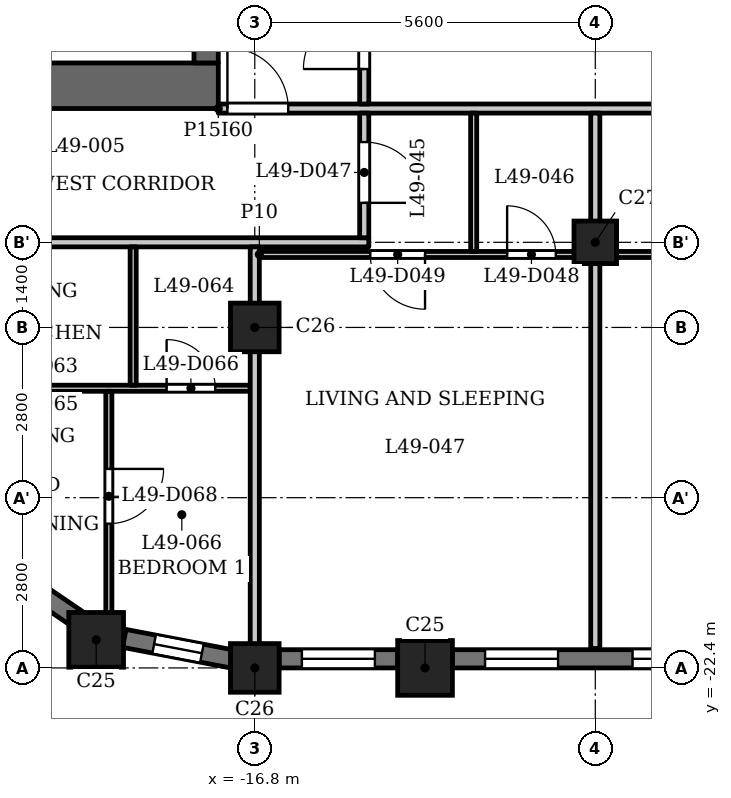
"""IFC4 building model, lengths in metres.
Left out: names, types, materials, properties, quantities, classifications, styles, units other than length and angle.
Written with IfcOpenShell. Run it as: python <this file> out.ifc"""

import sys

from ifc_helpers import new_model, si_unit, direction, frame, frame_2d, origin, origin_2d, place, context, subcontext, project, spatial, rectangle, extrude, element, fill, save


model = new_model("IFC4")
c1 = context("Model", 3, precision=1e-05, world=origin(), true_north=direction((0.0, 1.0)))
c2 = subcontext(c1, "Body", "Model", "MODEL_VIEW")
j1 = project(units=[si_unit("LENGTHUNIT", "METRE"), si_unit("PLANEANGLEUNIT", "RADIAN")], contexts=[c1])
p1 = place(None, origin())
s1 = spatial("IfcSite", under=j1, at=p1, CompositionType="ELEMENT")
p2 = place(p1, origin())
s2 = spatial("IfcBuilding", under=s1, at=p2, CompositionType="ELEMENT")
p3 = place(p2, frame((0.0, 0.0, 192.4)))
s3 = spatial("IfcBuildingStorey", under=s2, at=p3, CompositionType="ELEMENT", Elevation=192.4)
for number, where, z_axis, x_axis in (
    (1, (-19.409, -21.938, 0.0), (0.0, 0.0, 1.0), (1.0, 0.0, 0.0)),
    (2, (-14.0, -22.4, 0.0), (0.0, 0.0, 1.0), (1.0, 0.0, 0.0)),
):
    element("IfcColumn", number, at=place(p3, frame(where, z_axis=z_axis, x_axis=x_axis)), inside=s3, PredefinedType="COLUMN", context=c2, shape_type="SweptSolid", body=[
        extrude(rectangle(XDim=0.9, YDim=0.9, at=origin_2d()), origin(), (0.0, 0.0, 1.0), 3.5),
    ])
for number, where, z_axis, x_axis in (
    (3, (-16.8, -22.4, 0.0), (0.0, 0.0, 1.0), (1.0, 0.0, 0.0)),
    (4, (-16.8, -16.8, 0.0), (0.0, 0.0, 1.0), (1.0, 0.0, 0.0)),
):
    element("IfcColumn", number, at=place(p3, frame(where, z_axis=z_axis, x_axis=x_axis)), inside=s3, PredefinedType="COLUMN", context=c2, shape_type="SweptSolid", body=[
        extrude(rectangle(XDim=0.8, YDim=0.8, at=origin_2d()), origin(), (0.0, 0.0, 1.0), 3.5),
    ])
p4 = place(p3, frame((-11.2, -15.4, 0.0), z_axis=(0.0, 0.0, 1.0), x_axis=(1.0, 0.0, 0.0)))
e5 = element("IfcColumn", 5, at=p4, inside=s3, PredefinedType="COLUMN", context=c2, shape_type="SweptSolid", body=[
    extrude(rectangle(XDim=0.7, YDim=0.7, at=origin_2d()), origin(), (0.0, 0.0, 1.0), 3.5),
])
p5 = place(p3, frame((-20.775, -20.876, 0.0), z_axis=(0.0, 0.0, 1.0), x_axis=(0.827075824828, -0.562090366388, 0.0)))
e6 = element("IfcWall", 6, at=p5, inside=s3, PredefinedType="SOLIDWALL", context=c2, shape_type="SweptSolid", body=[
    extrude(rectangle(XDim=1.277, YDim=0.3, at=frame_2d((0.638, 0.0))), origin(), (0.0, 0.0, 1.0), 2.5),
])
p6 = place(p3, frame((-18.946, -21.914, 0.0), z_axis=(0.0, 0.0, 1.0), x_axis=(0.98230529033, -0.187286722942, 0.0)))
e7 = element("IfcWall", 7, at=p6, inside=s3, PredefinedType="SOLIDWALL", context=c2, shape_type="SweptSolid", body=[
    extrude(rectangle(XDim=1.799, YDim=0.3, at=frame_2d((0.899, 0.0))), origin(), (0.0, 0.0, 1.0), 2.5),
])
p7 = place(p6, frame((0.5, 0.0, 0.6)))
e8 = element("IfcOpeningElement", 8, at=p7, cuts=e7, PredefinedType="OPENING", context=c2, shape_type="SweptSolid", body=[
    extrude(rectangle(XDim=0.8, YDim=1.55, at=frame_2d((0.4, 0.775))), frame((0.0, 0.16, 0.0), z_axis=(0.0, -1.0, 0.0), x_axis=(1.0, 0.0, 0.0)), (0.0, 0.0, 1.0), 0.32),
])
p8 = place(p3, frame((-16.4, -22.25, 0.0), z_axis=(0.0, 0.0, 1.0), x_axis=(1.0, 0.0, 0.0)))
e9 = element("IfcWall", 9, at=p8, inside=s3, PredefinedType="SOLIDWALL", context=c2, shape_type="SweptSolid", body=[
    extrude(rectangle(XDim=1.95, YDim=0.3, at=frame_2d((0.975, 0.0))), origin(), (0.0, 0.0, 1.0), 2.5),
])
p9 = place(p8, frame((0.375, 0.0, 0.6)))
e10 = element("IfcOpeningElement", 10, at=p9, cuts=e9, PredefinedType="OPENING", context=c2, shape_type="SweptSolid", body=[
    extrude(rectangle(XDim=1.2, YDim=1.55, at=frame_2d((0.6, 0.775))), frame((0.0, 0.16, 0.0), z_axis=(0.0, -1.0, 0.0), x_axis=(1.0, 0.0, 0.0)), (0.0, 0.0, 1.0), 0.32),
])
p10 = place(p3, frame((-13.55, -22.25, 0.0), z_axis=(0.0, 0.0, 1.0), x_axis=(1.0, 0.0, 0.0)))
e11 = element("IfcWall", 11, at=p10, inside=s3, PredefinedType="SOLIDWALL", context=c2, shape_type="SweptSolid", body=[
    extrude(rectangle(XDim=4.7, YDim=0.3, at=frame_2d((2.35, 0.0))), origin(), (0.0, 0.0, 1.0), 2.5),
])
p11 = place(p10, frame((0.538, 0.0, 0.6)))
e12 = element("IfcOpeningElement", 12, at=p11, cuts=e11, PredefinedType="OPENING", context=c2, shape_type="SweptSolid", body=[
    extrude(rectangle(XDim=1.2, YDim=1.55, at=frame_2d((0.6, 0.775))), frame((0.0, 0.16, 0.0), z_axis=(0.0, -1.0, 0.0), x_axis=(1.0, 0.0, 0.0)), (0.0, 0.0, 1.0), 0.32),
])
p12 = place(p10, frame((2.962, 0.0, 0.6)))
e13 = element("IfcOpeningElement", 13, at=p12, cuts=e11, PredefinedType="OPENING", context=c2, shape_type="SweptSolid", body=[
    extrude(rectangle(XDim=1.2, YDim=1.55, at=frame_2d((0.6, 0.775))), frame((0.0, 0.16, 0.0), z_axis=(0.0, -1.0, 0.0), x_axis=(1.0, 0.0, 0.0)), (0.0, 0.0, 1.0), 0.32),
])
p13 = place(p3, frame((-17.4, -12.825, 0.0), z_axis=(0.0, 0.0, 1.0), x_axis=(-1.0, 0.0, 0.0)))
e14 = element("IfcWall", 14, at=p13, inside=s3, PredefinedType="SHEAR", context=c2, shape_type="SweptSolid", body=[
    extrude(rectangle(XDim=7.6, YDim=0.75, at=frame_2d((3.8, 0.0))), origin(), (0.0, 0.0, 1.0), 3.2),
])
p14 = place(p3, frame((-17.6, -12.45, 0.0), z_axis=(0.0, 0.0, 1.0), x_axis=(0.0, 1.0, 0.0)))
e15 = element("IfcWall", 15, at=p14, inside=s3, PredefinedType="SHEAR", context=c2, shape_type="SweptSolid", body=[
    extrude(rectangle(XDim=24.9, YDim=0.4, at=frame_2d((12.45, 0.0))), origin(), (0.0, 0.0, 1.0), 3.2),
])
p15 = place(p14, frame((6.325, 0.0, 0.0)))
e16 = element("IfcOpeningElement", 16, at=p15, cuts=e15, PredefinedType="OPENING", context=c2, shape_type="SweptSolid", body=[
    extrude(rectangle(XDim=0.9, YDim=2.1, at=frame_2d((0.45, 1.05))), frame((0.0, 0.21, 0.0), z_axis=(0.0, -1.0, 0.0), x_axis=(1.0, 0.0, 0.0)), (0.0, 0.0, 1.0), 0.42),
])
p16 = place(p14, frame((9.925, 0.0, 0.0)))
e17 = element("IfcOpeningElement", 17, at=p16, cuts=e15, PredefinedType="OPENING", context=c2, shape_type="SweptSolid", body=[
    extrude(rectangle(XDim=0.9, YDim=2.1, at=frame_2d((0.45, 1.05))), frame((0.0, 0.21, 0.0), z_axis=(0.0, -1.0, 0.0), x_axis=(1.0, 0.0, 0.0)), (0.0, 0.0, 1.0), 0.42),
])
p17 = place(p14, frame((15.6, 0.0, 0.0)))
e18 = element("IfcOpeningElement", 18, at=p17, cuts=e15, PredefinedType="OPENING", context=c2, shape_type="SweptSolid", body=[
    extrude(rectangle(XDim=1.1, YDim=2.1, at=frame_2d((0.55, 1.05))), frame((0.0, 0.21, 0.0), z_axis=(0.0, -1.0, 0.0), x_axis=(1.0, 0.0, 0.0)), (0.0, 0.0, 1.0), 0.42),
])
p18 = place(p14, frame((18.0, 0.0, 0.0)))
e19 = element("IfcOpeningElement", 19, at=p18, cuts=e15, PredefinedType="OPENING", context=c2, shape_type="SweptSolid", body=[
    extrude(rectangle(XDim=1.1, YDim=2.1, at=frame_2d((0.55, 1.05))), frame((0.0, 0.21, 0.0), z_axis=(0.0, -1.0, 0.0), x_axis=(1.0, 0.0, 0.0)), (0.0, 0.0, 1.0), 0.42),
])
p19 = place(p14, frame((23.025, 0.0, 0.0)))
e20 = element("IfcOpeningElement", 20, at=p19, cuts=e15, PredefinedType="OPENING", context=c2, shape_type="SweptSolid", body=[
    extrude(rectangle(XDim=1.1, YDim=2.1, at=frame_2d((0.55, 1.05))), frame((0.0, 0.21, 0.0), z_axis=(0.0, -1.0, 0.0), x_axis=(1.0, 0.0, 0.0)), (0.0, 0.0, 1.0), 0.42),
])
p20 = place(p14, frame((0.775, 0.0, 0.0)))
e21 = element("IfcOpeningElement", 21, at=p20, cuts=e15, PredefinedType="OPENING", context=c2, shape_type="SweptSolid", body=[
    extrude(rectangle(XDim=1.1, YDim=2.1, at=frame_2d((0.55, 1.05))), frame((0.0, 0.21, 0.0), z_axis=(0.0, -1.0, 0.0), x_axis=(1.0, 0.0, 0.0)), (0.0, 0.0, 1.0), 0.42),
])
p21 = place(p14, frame((12.925, 0.0, 0.0)))
e22 = element("IfcOpeningElement", 22, at=p21, cuts=e15, PredefinedType="OPENING", context=c2, shape_type="SweptSolid", body=[
    extrude(rectangle(XDim=1.8, YDim=2.1, at=frame_2d((0.9, 1.05))), frame((0.0, 0.21, 0.0), z_axis=(0.0, -1.0, 0.0), x_axis=(1.0, 0.0, 0.0)), (0.0, 0.0, 1.0), 0.42),
])
p22 = place(p3, frame((-23.594, -17.8, 0.0), z_axis=(0.0, 0.0, 1.0), x_axis=(1.0, 0.0, 0.0)))
e23 = element("IfcWall", 23, at=p22, inside=s3, PredefinedType="PARTITIONING", context=c2, shape_type="SweptSolid", body=[
    extrude(rectangle(XDim=6.719, YDim=0.1, at=frame_2d((3.359, 0.0))), origin(), (0.0, 0.0, 1.0), 3.2),
])
p23 = place(p22, frame((5.344, 0.0, 0.0)))
e24 = element("IfcOpeningElement", 24, at=p23, cuts=e23, PredefinedType="OPENING", context=c2, shape_type="SweptSolid", body=[
    extrude(rectangle(XDim=0.8, YDim=2.1, at=frame_2d((0.4, 1.05))), frame((0.0, 0.06, 0.0), z_axis=(0.0, -1.0, 0.0), x_axis=(1.0, 0.0, 0.0)), (0.0, 0.0, 1.0), 0.12),
])
p24 = place(p22, frame((1.126, 0.0, 0.0)))
e25 = element("IfcOpeningElement", 25, at=p24, cuts=e23, PredefinedType="OPENING", context=c2, shape_type="SweptSolid", body=[
    extrude(rectangle(XDim=0.9, YDim=2.1, at=frame_2d((0.45, 1.05))), frame((0.0, 0.06, 0.0), z_axis=(0.0, -1.0, 0.0), x_axis=(1.0, 0.0, 0.0)), (0.0, 0.0, 1.0), 0.12),
])
p25 = place(p3, frame((-16.725, -15.6, 0.0), z_axis=(0.0, 0.0, 1.0), x_axis=(1.0, 0.0, 0.0)))
e26 = element("IfcWall", 26, at=p25, inside=s3, PredefinedType="PARTITIONING", context=c2, shape_type="SweptSolid", body=[
    extrude(rectangle(XDim=33.45, YDim=0.1, at=frame_2d((16.725, 0.0))), origin(), (0.0, 0.0, 1.0), 3.2),
])
p26 = place(p25, frame((4.075, 0.0, 0.0)))
e27 = element("IfcOpeningElement", 27, at=p26, cuts=e26, PredefinedType="OPENING", context=c2, shape_type="SweptSolid", body=[
    extrude(rectangle(XDim=0.8, YDim=2.1, at=frame_2d((0.4, 1.05))), frame((0.0, 0.06, 0.0), z_axis=(0.0, -1.0, 0.0), x_axis=(1.0, 0.0, 0.0)), (0.0, 0.0, 1.0), 0.12),
])
p27 = place(p25, frame((1.825, 0.0, 0.0)))
e28 = element("IfcOpeningElement", 28, at=p27, cuts=e26, PredefinedType="OPENING", context=c2, shape_type="SweptSolid", body=[
    extrude(rectangle(XDim=0.9, YDim=2.1, at=frame_2d((0.45, 1.05))), frame((0.0, 0.06, 0.0), z_axis=(0.0, -1.0, 0.0), x_axis=(1.0, 0.0, 0.0)), (0.0, 0.0, 1.0), 0.12),
])
p28 = place(p25, frame((9.675, 0.0, 0.0)))
e29 = element("IfcOpeningElement", 29, at=p28, cuts=e26, PredefinedType="OPENING", context=c2, shape_type="SweptSolid", body=[
    extrude(rectangle(XDim=0.8, YDim=2.1, at=frame_2d((0.4, 1.05))), frame((0.0, 0.06, 0.0), z_axis=(0.0, -1.0, 0.0), x_axis=(1.0, 0.0, 0.0)), (0.0, 0.0, 1.0), 0.12),
])
p29 = place(p25, frame((14.025, 0.0, 0.0)))
e30 = element("IfcOpeningElement", 30, at=p29, cuts=e26, PredefinedType="OPENING", context=c2, shape_type="SweptSolid", body=[
    extrude(rectangle(XDim=0.9, YDim=2.1, at=frame_2d((0.45, 1.05))), frame((0.0, 0.06, 0.0), z_axis=(0.0, -1.0, 0.0), x_axis=(1.0, 0.0, 0.0)), (0.0, 0.0, 1.0), 0.12),
])
p30 = place(p25, frame((20.875, 0.0, 0.0)))
e31 = element("IfcOpeningElement", 31, at=p30, cuts=e26, PredefinedType="OPENING", context=c2, shape_type="SweptSolid", body=[
    extrude(rectangle(XDim=0.8, YDim=2.1, at=frame_2d((0.4, 1.05))), frame((0.0, 0.06, 0.0), z_axis=(0.0, -1.0, 0.0), x_axis=(1.0, 0.0, 0.0)), (0.0, 0.0, 1.0), 0.12),
])
p31 = place(p25, frame((25.225, 0.0, 0.0)))
e32 = element("IfcOpeningElement", 32, at=p31, cuts=e26, PredefinedType="OPENING", context=c2, shape_type="SweptSolid", body=[
    extrude(rectangle(XDim=0.9, YDim=2.1, at=frame_2d((0.45, 1.05))), frame((0.0, 0.06, 0.0), z_axis=(0.0, -1.0, 0.0), x_axis=(1.0, 0.0, 0.0)), (0.0, 0.0, 1.0), 0.12),
])
p32 = place(p25, frame((28.475, 0.0, 0.0)))
e33 = element("IfcOpeningElement", 33, at=p32, cuts=e26, PredefinedType="OPENING", context=c2, shape_type="SweptSolid", body=[
    extrude(rectangle(XDim=0.8, YDim=2.1, at=frame_2d((0.4, 1.05))), frame((0.0, 0.06, 0.0), z_axis=(0.0, -1.0, 0.0), x_axis=(1.0, 0.0, 0.0)), (0.0, 0.0, 1.0), 0.12),
])
p33 = place(p25, frame((30.675, 0.0, 0.0)))
e34 = element("IfcOpeningElement", 34, at=p33, cuts=e26, PredefinedType="OPENING", context=c2, shape_type="SweptSolid", body=[
    extrude(rectangle(XDim=0.9, YDim=2.1, at=frame_2d((0.45, 1.05))), frame((0.0, 0.06, 0.0), z_axis=(0.0, -1.0, 0.0), x_axis=(1.0, 0.0, 0.0)), (0.0, 0.0, 1.0), 0.12),
])
p34 = place(p3, frame((-24.684, -15.4, 0.0), z_axis=(0.0, 0.0, 1.0), x_axis=(1.0, 0.0, 0.0)))
e35 = element("IfcWall", 35, at=p34, inside=s3, PredefinedType="PARTITIONING", context=c2, shape_type="SweptSolid", body=[
    extrude(rectangle(XDim=9.759, YDim=0.15, at=frame_2d((4.879, 0.0))), origin(), (0.0, 0.0, 1.0), 3.2),
])
p35 = place(p34, frame((1.143, 0.0, 0.0)))
e36 = element("IfcOpeningElement", 36, at=p35, cuts=e35, PredefinedType="OPENING", context=c2, shape_type="SweptSolid", body=[
    extrude(rectangle(XDim=1.0, YDim=2.1, at=frame_2d((0.5, 1.05))), frame((0.0, 0.085, 0.0), z_axis=(0.0, -1.0, 0.0), x_axis=(1.0, 0.0, 0.0)), (0.0, 0.0, 1.0), 0.17),
])
p36 = place(p3, frame((-17.4, -13.2, 0.0), z_axis=(0.0, 0.0, 1.0), x_axis=(1.0, 0.0, 0.0)))
e37 = element("IfcWall", 37, at=p36, inside=s3, PredefinedType="PARTITIONING", context=c2, shape_type="SweptSolid", body=[
    extrude(rectangle(XDim=34.8, YDim=0.15, at=frame_2d((17.4, 0.0))), origin(), (0.0, 0.0, 1.0), 3.2),
])
p37 = place(p36, frame((0.15, 0.0, 0.0)))
e38 = element("IfcOpeningElement", 38, at=p37, cuts=e37, PredefinedType="OPENING", context=c2, shape_type="SweptSolid", body=[
    extrude(rectangle(XDim=1.0, YDim=2.1, at=frame_2d((0.5, 1.05))), frame((0.0, 0.085, 0.0), z_axis=(0.0, -1.0, 0.0), x_axis=(1.0, 0.0, 0.0)), (0.0, 0.0, 1.0), 0.17),
])
p38 = place(p36, frame((33.55, 0.0, 0.0)))
e39 = element("IfcOpeningElement", 39, at=p38, cuts=e37, PredefinedType="OPENING", context=c2, shape_type="SweptSolid", body=[
    extrude(rectangle(XDim=1.0, YDim=2.1, at=frame_2d((0.5, 1.05))), frame((0.0, 0.085, 0.0), z_axis=(0.0, -1.0, 0.0), x_axis=(1.0, 0.0, 0.0)), (0.0, 0.0, 1.0), 0.17),
])
p39 = place(p36, frame((15.7, 0.0, 0.0)))
e40 = element("IfcOpeningElement", 40, at=p39, cuts=e37, PredefinedType="OPENING", context=c2, shape_type="SweptSolid", body=[
    extrude(rectangle(XDim=1.0, YDim=2.1, at=frame_2d((0.5, 1.05))), frame((0.0, 0.085, 0.0), z_axis=(0.0, -1.0, 0.0), x_axis=(1.0, 0.0, 0.0)), (0.0, 0.0, 1.0), 0.17),
])
p40 = place(p36, frame((26.9, 0.0, 0.0)))
e41 = element("IfcOpeningElement", 41, at=p40, cuts=e37, PredefinedType="OPENING", context=c2, shape_type="SweptSolid", body=[
    extrude(rectangle(XDim=1.0, YDim=2.1, at=frame_2d((0.5, 1.05))), frame((0.0, 0.085, 0.0), z_axis=(0.0, -1.0, 0.0), x_axis=(1.0, 0.0, 0.0)), (0.0, 0.0, 1.0), 0.17),
])
p41 = place(p3, frame((-19.2, -21.92, 0.0), z_axis=(0.0, 0.0, 1.0), x_axis=(0.0, 1.0, 0.0)))
e42 = element("IfcWall", 42, at=p41, inside=s3, PredefinedType="PARTITIONING", context=c2, shape_type="SweptSolid", body=[
    extrude(rectangle(XDim=4.07, YDim=0.1, at=frame_2d((2.035, 0.0))), origin(), (0.0, 0.0, 1.0), 3.2),
])
p42 = place(p41, frame((1.893, 0.0, 0.0)))
e43 = element("IfcOpeningElement", 43, at=p42, cuts=e42, PredefinedType="OPENING", context=c2, shape_type="SweptSolid", body=[
    extrude(rectangle(XDim=0.9, YDim=2.1, at=frame_2d((0.45, 1.05))), frame((0.0, 0.06, 0.0), z_axis=(0.0, -1.0, 0.0), x_axis=(1.0, 0.0, 0.0)), (0.0, 0.0, 1.0), 0.12),
])
p43 = place(p3, frame((-18.8, -17.75, 0.0), z_axis=(0.0, 0.0, 1.0), x_axis=(0.0, 1.0, 0.0)))
e44 = element("IfcWall", 44, at=p43, inside=s3, PredefinedType="PARTITIONING", context=c2, shape_type="SweptSolid", body=[
    extrude(rectangle(XDim=2.275, YDim=0.1, at=frame_2d((1.137, 0.0))), origin(), (0.0, 0.0, 1.0), 3.2),
])
p44 = place(p3, frame((-16.8, -22.31, 0.0), z_axis=(0.0, 0.0, 1.0), x_axis=(0.0, 1.0, 0.0)))
e45 = element("IfcWall", 45, at=p44, inside=s3, PredefinedType="PARTITIONING", context=c2, shape_type="SweptSolid", body=[
    extrude(rectangle(XDim=6.835, YDim=0.15, at=frame_2d((3.417, 0.0))), origin(), (0.0, 0.0, 1.0), 2.55),
])
p45 = place(p3, frame((-15.0, -15.325, 0.0), z_axis=(0.0, 0.0, 1.0), x_axis=(0.0, 1.0, 0.0)))
e46 = element("IfcWall", 46, at=p45, inside=s3, PredefinedType="PARTITIONING", context=c2, shape_type="SweptSolid", body=[
    extrude(rectangle(XDim=2.05, YDim=0.15, at=frame_2d((1.025, 0.0))), origin(), (0.0, 0.0, 1.0), 3.2),
])
p46 = place(p45, frame((0.574, 0.0, 0.0)))
e47 = element("IfcOpeningElement", 47, at=p46, cuts=e46, PredefinedType="OPENING", context=c2, shape_type="SweptSolid", body=[
    extrude(rectangle(XDim=1.0, YDim=2.1, at=frame_2d((0.5, 1.05))), frame((0.0, 0.085, 0.0), z_axis=(0.0, -1.0, 0.0), x_axis=(1.0, 0.0, 0.0)), (0.0, 0.0, 1.0), 0.17),
])
p47 = place(p3, frame((-15.0, -13.125, 0.0), z_axis=(0.0, 0.0, 1.0), x_axis=(0.0, 1.0, 0.0)))
e48 = element("IfcWall", 48, at=p47, inside=s3, PredefinedType="PARTITIONING", context=c2, shape_type="SweptSolid", body=[
    extrude(rectangle(XDim=6.356, YDim=0.15, at=frame_2d((3.178, 0.0))), origin(), (0.0, 0.0, 1.0), 3.2),
])
p48 = place(p47, frame((0.575, 0.0, 0.0)))
e49 = element("IfcOpeningElement", 49, at=p48, cuts=e48, PredefinedType="OPENING", context=c2, shape_type="SweptSolid", body=[
    extrude(rectangle(XDim=1.0, YDim=2.1, at=frame_2d((0.5, 1.05))), frame((0.0, 0.085, 0.0), z_axis=(0.0, -1.0, 0.0), x_axis=(1.0, 0.0, 0.0)), (0.0, 0.0, 1.0), 0.17),
])
p49 = place(p3, frame((-13.2, -15.55, 0.0), z_axis=(0.0, 0.0, 1.0), x_axis=(0.0, 1.0, 0.0)))
e50 = element("IfcWall", 50, at=p49, inside=s3, PredefinedType="PARTITIONING", context=c2, shape_type="SweptSolid", body=[
    extrude(rectangle(XDim=2.275, YDim=0.1, at=frame_2d((1.138, 0.0))), origin(), (0.0, 0.0, 1.0), 3.2),
])
p50 = place(p3, frame((-11.2, -22.08, 0.0), z_axis=(0.0, 0.0, 1.0), x_axis=(0.0, 1.0, 0.0)))
e51 = element("IfcWall", 51, at=p50, inside=s3, PredefinedType="PARTITIONING", context=c2, shape_type="SweptSolid", body=[
    extrude(rectangle(XDim=6.43, YDim=0.15, at=frame_2d((3.215, 0.0))), origin(), (0.0, 0.0, 1.0), 3.2),
])
p51 = place(p3, frame((-11.2, -15.55, 0.0), z_axis=(0.0, 0.0, 1.0), x_axis=(0.0, 1.0, 0.0)))
e52 = element("IfcWall", 52, at=p51, inside=s3, PredefinedType="PARTITIONING", context=c2, shape_type="SweptSolid", body=[
    extrude(rectangle(XDim=2.275, YDim=0.15, at=frame_2d((1.138, 0.0))), origin(), (0.0, 0.0, 1.0), 3.2),
])
p52 = place(p48, origin())
e53 = element("IfcDoor", 53, at=p52, inside=s3, OperationType="SINGLE_SWING_RIGHT", PredefinedType="DOOR", context=c2, shape_type="SweptSolid", body=[
    extrude(rectangle(XDim=1.0, YDim=2.1, at=frame_2d((0.5, 1.05))), frame((0.0, 0.025, 0.0), z_axis=(0.0, -1.0, 0.0), x_axis=(1.0, 0.0, 0.0)), (0.0, 0.0, 1.0), 0.05),
])
fill(e49, e53)
p53 = place(p37, origin())
e54 = element("IfcDoor", 54, at=p53, inside=s3, OperationType="SINGLE_SWING_RIGHT", PredefinedType="DOOR", context=c2, shape_type="SweptSolid", body=[
    extrude(rectangle(XDim=1.0, YDim=2.1, at=frame_2d((0.5, 1.05))), frame((0.0, 0.025, 0.0), z_axis=(0.0, -1.0, 0.0), x_axis=(1.0, 0.0, 0.0)), (0.0, 0.0, 1.0), 0.05),
])
fill(e38, e54)
p54 = place(p46, origin())
e55 = element("IfcDoor", 55, at=p54, inside=s3, OperationType="SINGLE_SWING_LEFT", PredefinedType="DOOR", context=c2, shape_type="SweptSolid", body=[
    extrude(rectangle(XDim=1.0, YDim=2.1, at=frame_2d((0.5, 1.05))), frame((0.0, 0.025, 0.0), z_axis=(0.0, -1.0, 0.0), x_axis=(1.0, 0.0, 0.0)), (0.0, 0.0, 1.0), 0.05),
])
fill(e47, e55)
p55 = place(p26, origin())
e56 = element("IfcDoor", 56, at=p55, inside=s3, OperationType="SINGLE_SWING_RIGHT", PredefinedType="DOOR", context=c2, shape_type="SweptSolid", body=[
    extrude(rectangle(XDim=0.8, YDim=2.1, at=frame_2d((0.4, 1.05))), frame((0.0, 0.025, 0.0), z_axis=(0.0, -1.0, 0.0), x_axis=(1.0, 0.0, 0.0)), (0.0, 0.0, 1.0), 0.05),
])
fill(e27, e56)
p56 = place(p27, origin())
e57 = element("IfcDoor", 57, at=p56, inside=s3, OperationType="SINGLE_SWING_RIGHT", PredefinedType="DOOR", context=c2, shape_type="SweptSolid", body=[
    extrude(rectangle(XDim=0.9, YDim=2.1, at=frame_2d((0.45, 1.05))), frame((0.0, 0.025, 0.0), z_axis=(0.0, -1.0, 0.0), x_axis=(1.0, 0.0, 0.0)), (0.0, 0.0, 1.0), 0.05),
])
fill(e28, e57)
p57 = place(p23, origin())
e58 = element("IfcDoor", 58, at=p57, inside=s3, OperationType="SINGLE_SWING_RIGHT", PredefinedType="DOOR", context=c2, shape_type="SweptSolid", body=[
    extrude(rectangle(XDim=0.8, YDim=2.1, at=frame_2d((0.4, 1.05))), frame((0.0, 0.025, 0.0), z_axis=(0.0, -1.0, 0.0), x_axis=(1.0, 0.0, 0.0)), (0.0, 0.0, 1.0), 0.05),
])
fill(e24, e58)
p58 = place(p42, origin())
e59 = element("IfcDoor", 59, at=p58, inside=s3, OperationType="SINGLE_SWING_RIGHT", PredefinedType="DOOR", context=c2, shape_type="SweptSolid", body=[
    extrude(rectangle(XDim=0.9, YDim=2.1, at=frame_2d((0.45, 1.05))), frame((0.0, 0.025, 0.0), z_axis=(0.0, -1.0, 0.0), x_axis=(1.0, 0.0, 0.0)), (0.0, 0.0, 1.0), 0.05),
])
fill(e43, e59)
p59 = place(p7, origin())
e60 = element("IfcWindow", 60, at=p59, inside=s3, PartitioningType="SINGLE_PANEL", PredefinedType="WINDOW", context=c2, shape_type="SweptSolid", body=[
    extrude(rectangle(XDim=0.8, YDim=1.55, at=frame_2d((0.4, 0.775))), frame((0.0, 0.03, 0.0), z_axis=(0.0, -1.0, 0.0), x_axis=(1.0, 0.0, 0.0)), (0.0, 0.0, 1.0), 0.06),
])
fill(e8, e60)
p60 = place(p9, origin())
e61 = element("IfcWindow", 61, at=p60, inside=s3, PartitioningType="SINGLE_PANEL", PredefinedType="WINDOW", context=c2, shape_type="SweptSolid", body=[
    extrude(rectangle(XDim=1.2, YDim=1.55, at=frame_2d((0.6, 0.775))), frame((0.0, 0.03, 0.0), z_axis=(0.0, -1.0, 0.0), x_axis=(1.0, 0.0, 0.0)), (0.0, 0.0, 1.0), 0.06),
])
fill(e10, e61)
p61 = place(p11, origin())
e62 = element("IfcWindow", 62, at=p61, inside=s3, PartitioningType="SINGLE_PANEL", PredefinedType="WINDOW", context=c2, shape_type="SweptSolid", body=[
    extrude(rectangle(XDim=1.2, YDim=1.55, at=frame_2d((0.6, 0.775))), frame((0.0, 0.03, 0.0), z_axis=(0.0, -1.0, 0.0), x_axis=(1.0, 0.0, 0.0)), (0.0, 0.0, 1.0), 0.06),
])
fill(e12, e62)
p62 = place(p12, origin())
e63 = element("IfcWindow", 63, at=p62, inside=s3, PartitioningType="SINGLE_PANEL", PredefinedType="WINDOW", context=c2, shape_type="SweptSolid", body=[
    extrude(rectangle(XDim=1.2, YDim=1.55, at=frame_2d((0.6, 0.775))), frame((0.0, 0.03, 0.0), z_axis=(0.0, -1.0, 0.0), x_axis=(1.0, 0.0, 0.0)), (0.0, 0.0, 1.0), 0.06),
])
fill(e13, e63)
save(model, sys.argv[1])
